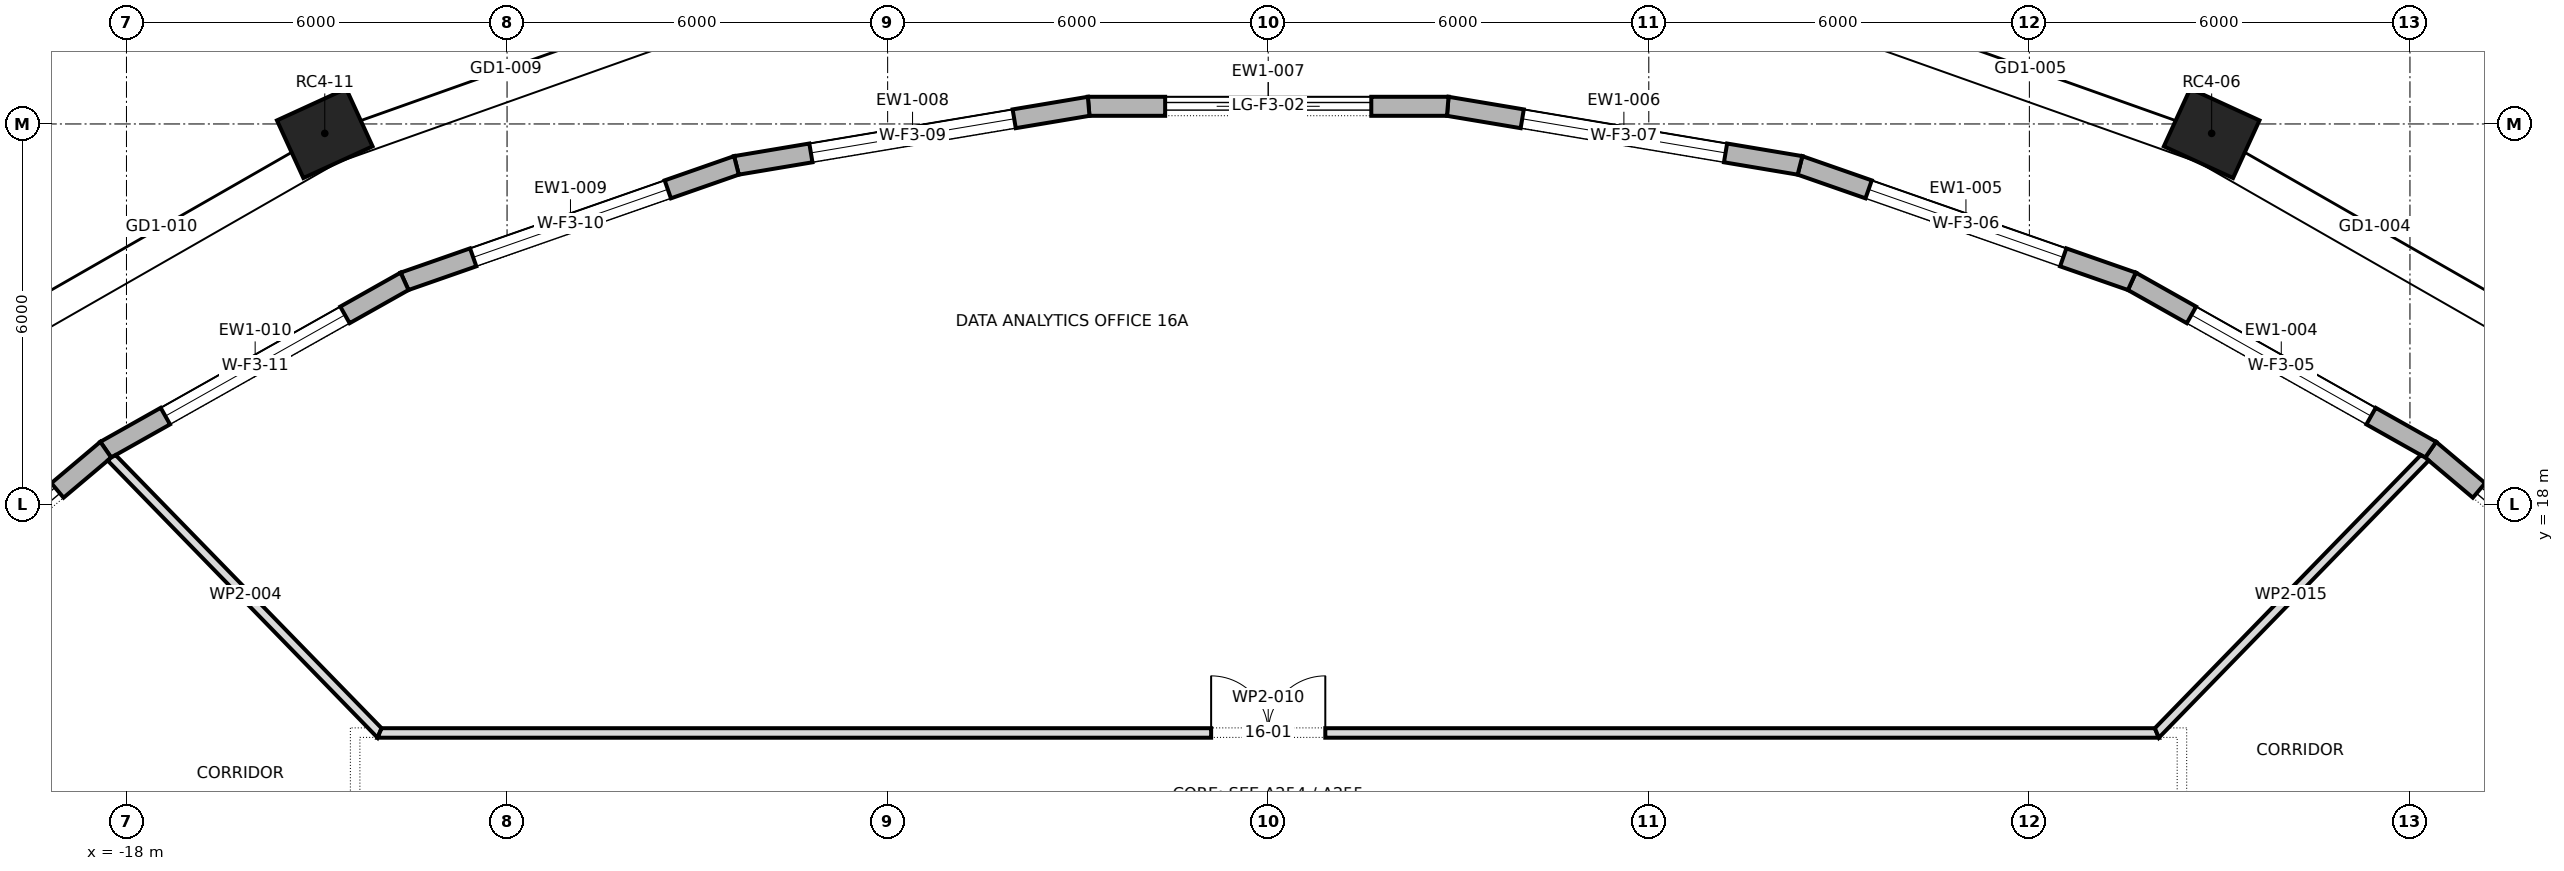
"""IFC4 building model, lengths in metres.
Left out: names, types, materials, properties, quantities, classifications, styles, units other than length and angle.
Written with IfcOpenShell. Run it as: python <this file> out.ifc"""

import sys

from ifc_helpers import new_model, si_unit, direction, frame, frame_2d, origin, origin_2d, place, context, subcontext, project, spatial, polyline, rectangle, outline, extrude, element, fill, save


model = new_model("IFC4")
c1 = context("Model", 3, precision=1e-05, world=origin(), true_north=direction((0.0, 1.0)))
c2 = subcontext(c1, "Body", "Model", "MODEL_VIEW")
j1 = project(units=[si_unit("LENGTHUNIT", "METRE"), si_unit("PLANEANGLEUNIT", "RADIAN")], contexts=[c1])
p1 = place(None, origin())
s1 = spatial("IfcSite", under=j1, at=p1, CompositionType="ELEMENT")
p2 = place(p1, origin())
s2 = spatial("IfcBuilding", under=s1, at=p2, CompositionType="ELEMENT")
p3 = place(p2, frame((0.0, 0.0, 226.9)))
s3 = spatial("IfcBuildingStorey", under=s2, at=p3, CompositionType="ELEMENT", Elevation=226.9)
for number, where, z_axis, x_axis in (
    (1, (14.874, 23.852, 0.0), (0.0, 0.0, 1.0), (-0.909, 0.417, 0.0)),
    (2, (-14.874, 23.852, 0.0), (0.0, 0.0, 1.0), (-0.909, -0.417, 0.0)),
):
    element("IfcColumn", number, at=place(p3, frame(where, z_axis=z_axis, x_axis=x_axis)), inside=s3, PredefinedType="COLUMN", context=c2, shape_type="SweptSolid", body=[
        extrude(rectangle(XDim=1.2, YDim=1.0, at=origin_2d()), origin(), (0.0, 0.0, 1.0), 4.0),
    ])
p4 = place(p3, frame((22.334, 15.486, 0.0), z_axis=(0.0, 0.0, 1.0), x_axis=(-0.764475071601, 0.644653290459, 0.0)))
e3 = element("IfcWall", 3, at=p4, inside=s3, PredefinedType="STANDARD", context=c2, shape_type="SweptSolid", body=[
    extrude(outline(polyline([(-0.015, -0.15), (5.257, -0.15), (5.229, 0.15), (0.015, 0.15), (-0.015, -0.15)])), origin(), (0.0, 0.0, 1.0), 3.7),
])
p5 = place(p4, frame((0.996, 0.0, 0.0)))
e4 = element("IfcOpeningElement", 4, at=p5, cuts=e3, PredefinedType="OPENING", context=c2, shape_type="SweptSolid", body=[
    extrude(rectangle(XDim=3.25, YDim=3.25, at=frame_2d((1.625, 1.625))), frame((0.0, 0.162, 0.0), z_axis=(0.0, -1.0, 0.0), x_axis=(1.0, 0.0, 0.0)), (0.0, 0.0, 1.0), 0.324),
])
p6 = place(p3, frame((18.326, 18.865, 0.0), z_axis=(0.0, 0.0, 1.0), x_axis=(-0.871225596594, 0.490882837181, 0.0)))
e5 = element("IfcWall", 5, at=p6, inside=s3, PredefinedType="STANDARD", context=c2, shape_type="SweptSolid", body=[
    extrude(outline(polyline([(-0.014, -0.15), (5.42, -0.15), (5.393, 0.15), (0.014, 0.15), (-0.014, -0.15)])), origin(), (0.0, 0.0, 1.0), 3.7),
])
p7 = place(p6, frame((1.078, 0.0, 0.6)))
e6 = element("IfcOpeningElement", 6, at=p7, cuts=e5, PredefinedType="OPENING", context=c2, shape_type="SweptSolid", body=[
    extrude(rectangle(XDim=3.25, YDim=2.65, at=frame_2d((1.625, 1.325))), frame((0.0, 0.162, 0.0), z_axis=(0.0, -1.0, 0.0), x_axis=(1.0, 0.0, 0.0)), (0.0, 0.0, 1.0), 0.324),
])
p8 = place(p3, frame((13.616, 21.52, 0.0), z_axis=(0.0, 0.0, 1.0), x_axis=(-0.944075859918, 0.329728328659, 0.0)))
e7 = element("IfcWall", 7, at=p8, inside=s3, PredefinedType="STANDARD", context=c2, shape_type="SweptSolid", body=[
    extrude(outline(polyline([(-0.013, -0.15), (5.555, -0.15), (5.53, 0.15), (0.013, 0.15), (-0.013, -0.15)])), origin(), (0.0, 0.0, 1.0), 3.7),
])
p9 = place(p8, frame((1.146, 0.0, 0.6)))
e8 = element("IfcOpeningElement", 8, at=p9, cuts=e7, PredefinedType="OPENING", context=c2, shape_type="SweptSolid", body=[
    extrude(rectangle(XDim=3.25, YDim=2.65, at=frame_2d((1.625, 1.325))), frame((0.0, 0.162, 0.0), z_axis=(0.0, -1.0, 0.0), x_axis=(1.0, 0.0, 0.0)), (0.0, 0.0, 1.0), 0.324),
])
p10 = place(p3, frame((8.384, 23.347, 0.0), z_axis=(0.0, 0.0, 1.0), x_axis=(-0.986223472554, 0.165418445715, 0.0)))
e9 = element("IfcWall", 9, at=p10, inside=s3, PredefinedType="STANDARD", context=c2, shape_type="SweptSolid", body=[
    extrude(outline(polyline([(-0.013, -0.15), (5.643, -0.15), (5.618, 0.15), (0.013, 0.15), (-0.013, -0.15)])), origin(), (0.0, 0.0, 1.0), 3.7),
])
p11 = place(p10, frame((1.19, 0.0, 0.6)))
e10 = element("IfcOpeningElement", 10, at=p11, cuts=e9, PredefinedType="OPENING", context=c2, shape_type="SweptSolid", body=[
    extrude(rectangle(XDim=3.25, YDim=2.65, at=frame_2d((1.625, 1.325))), frame((0.0, 0.162, 0.0), z_axis=(0.0, -1.0, 0.0), x_axis=(1.0, 0.0, 0.0)), (0.0, 0.0, 1.0), 0.324),
])
p12 = place(p3, frame((2.831, 24.278, 0.0), z_axis=(0.0, 0.0, 1.0), x_axis=(-1.0, 0.0, 0.0)))
e11 = element("IfcWall", 11, at=p12, inside=s3, PredefinedType="STANDARD", context=c2, shape_type="SweptSolid", body=[
    extrude(outline(polyline([(-0.012, -0.15), (5.674, -0.15), (5.649, 0.15), (0.012, 0.15), (-0.012, -0.15)])), origin(), (0.0, 0.0, 1.0), 3.7),
])
p13 = place(p12, frame((1.206, 0.0, 0.0)))
e12 = element("IfcOpeningElement", 12, at=p13, cuts=e11, PredefinedType="OPENING", context=c2, shape_type="SweptSolid", body=[
    extrude(rectangle(XDim=3.25, YDim=3.25, at=frame_2d((1.625, 1.625))), frame((0.0, 0.162, 0.0), z_axis=(0.0, -1.0, 0.0), x_axis=(1.0, 0.0, 0.0)), (0.0, 0.0, 1.0), 0.324),
])
p14 = place(p3, frame((-2.831, 24.278, 0.0), z_axis=(0.0, 0.0, 1.0), x_axis=(-0.986223472554, -0.165418445715, 0.0)))
e13 = element("IfcWall", 13, at=p14, inside=s3, PredefinedType="STANDARD", context=c2, shape_type="SweptSolid", body=[
    extrude(outline(polyline([(-0.012, -0.15), (5.643, -0.15), (5.618, 0.15), (0.012, 0.15), (-0.012, -0.15)])), origin(), (0.0, 0.0, 1.0), 3.7),
])
p15 = place(p14, frame((1.19, 0.0, 0.6)))
e14 = element("IfcOpeningElement", 14, at=p15, cuts=e13, PredefinedType="OPENING", context=c2, shape_type="SweptSolid", body=[
    extrude(rectangle(XDim=3.25, YDim=2.65, at=frame_2d((1.625, 1.325))), frame((0.0, 0.162, 0.0), z_axis=(0.0, -1.0, 0.0), x_axis=(1.0, 0.0, 0.0)), (0.0, 0.0, 1.0), 0.324),
])
p16 = place(p3, frame((-8.384, 23.347, 0.0), z_axis=(0.0, 0.0, 1.0), x_axis=(-0.944075859918, -0.329728328659, 0.0)))
e15 = element("IfcWall", 15, at=p16, inside=s3, PredefinedType="STANDARD", context=c2, shape_type="SweptSolid", body=[
    extrude(outline(polyline([(-0.013, -0.15), (5.556, -0.15), (5.529, 0.15), (0.013, 0.15), (-0.013, -0.15)])), origin(), (0.0, 0.0, 1.0), 3.7),
])
p17 = place(p16, frame((1.146, 0.0, 0.6)))
e16 = element("IfcOpeningElement", 16, at=p17, cuts=e15, PredefinedType="OPENING", context=c2, shape_type="SweptSolid", body=[
    extrude(rectangle(XDim=3.25, YDim=2.65, at=frame_2d((1.625, 1.325))), frame((0.0, 0.162, 0.0), z_axis=(0.0, -1.0, 0.0), x_axis=(1.0, 0.0, 0.0)), (0.0, 0.0, 1.0), 0.324),
])
p18 = place(p3, frame((-13.616, 21.52, 0.0), z_axis=(0.0, 0.0, 1.0), x_axis=(-0.871225596594, -0.490882837181, 0.0)))
e17 = element("IfcWall", 17, at=p18, inside=s3, PredefinedType="STANDARD", context=c2, shape_type="SweptSolid", body=[
    extrude(outline(polyline([(-0.013, -0.15), (5.421, -0.15), (5.393, 0.15), (0.013, 0.15), (-0.013, -0.15)])), origin(), (0.0, 0.0, 1.0), 3.7),
])
p19 = place(p18, frame((1.078, 0.0, 0.6)))
e18 = element("IfcOpeningElement", 18, at=p19, cuts=e17, PredefinedType="OPENING", context=c2, shape_type="SweptSolid", body=[
    extrude(rectangle(XDim=3.25, YDim=2.65, at=frame_2d((1.625, 1.325))), frame((0.0, 0.162, 0.0), z_axis=(0.0, -1.0, 0.0), x_axis=(1.0, 0.0, 0.0)), (0.0, 0.0, 1.0), 0.324),
])
p20 = place(p3, frame((-18.326, 18.865, 0.0), z_axis=(0.0, 0.0, 1.0), x_axis=(-0.764475071601, -0.644653290459, 0.0)))
e19 = element("IfcWall", 19, at=p20, inside=s3, PredefinedType="STANDARD", context=c2, shape_type="SweptSolid", body=[
    extrude(outline(polyline([(-0.014, -0.15), (5.258, -0.15), (5.228, 0.15), (0.014, 0.15), (-0.014, -0.15)])), origin(), (0.0, 0.0, 1.0), 3.7),
])
p21 = place(p20, frame((0.996, 0.0, 0.0)))
e20 = element("IfcOpeningElement", 20, at=p21, cuts=e19, PredefinedType="OPENING", context=c2, shape_type="SweptSolid", body=[
    extrude(rectangle(XDim=3.25, YDim=3.25, at=frame_2d((1.625, 1.625))), frame((0.0, 0.162, 0.0), z_axis=(0.0, -1.0, 0.0), x_axis=(1.0, 0.0, 0.0)), (0.0, 0.0, 1.0), 0.324),
])
p22 = place(p3, frame((-18.242, 18.747, 0.0), z_axis=(0.0, 0.0, 1.0), x_axis=(0.697616683155, -0.716471188105, 0.0)))
e21 = element("IfcWall", 21, at=p22, inside=s3, PredefinedType="PARTITIONING", context=c2, shape_type="SweptSolid", body=[
    extrude(outline(polyline([(0.0, -0.075), (1.525, -0.075), (3.049, -0.075), (4.574, -0.075), (6.099, -0.075), (6.067, 0.0), (6.035, 0.075), (4.533, 0.075), (3.031, 0.075), (1.528, 0.075), (0.025, 0.075), (0.005, -0.002), (0.0, -0.072), (0.0, -0.075)])), origin(), (0.0, 0.0, 1.0), 3.7),
])
p23 = place(p3, frame((-14.368, 9.948, 0.0), z_axis=(0.0, 0.0, 1.0), x_axis=(-0.822511136101, 0.568749005265, 0.0)))
e22 = element("IfcWall", 22, at=p23, inside=s3, PredefinedType="PARTITIONING", context=c2, shape_type="SweptSolid", body=[
    extrude(outline(polyline([(0.0, -0.075), (1.907, -0.075), (3.813, -0.075), (5.72, -0.075), (7.627, -0.075), (9.533, -0.075), (9.554, 0.0), (9.558, 0.069), (9.558, 0.075), (7.662, 0.075), (5.767, 0.075), (3.871, 0.075), (1.975, 0.075), (0.079, 0.075), (0.079, 0.075), (0.079, 0.075), (0.039, 0.0), (0.0, -0.075)])), origin(), (0.0, 0.0, 1.0), 2.947),
])
p24 = place(p3, frame((-14.042, 14.4, 0.0), z_axis=(0.0, 0.0, 1.0), x_axis=(1.0, 0.0, 0.0)))
e23 = element("IfcWall", 23, at=p24, inside=s3, PredefinedType="PARTITIONING", context=c2, shape_type="SweptSolid", body=[
    extrude(outline(polyline([(0.0, -0.075), (1.872, -0.075), (3.745, -0.075), (5.617, -0.075), (7.489, -0.075), (9.361, -0.075), (11.233, -0.075), (13.106, -0.075), (14.978, -0.075), (16.85, -0.075), (18.722, -0.075), (20.594, -0.075), (22.467, -0.075), (24.339, -0.075), (26.211, -0.075), (28.083, -0.075), (28.02, 0.075), (26.023, 0.075), (24.026, 0.075), (22.029, 0.075), (20.032, 0.075), (18.036, 0.075), (16.039, 0.075), (14.042, 0.075), (12.045, 0.075), (10.048, 0.075), (8.051, 0.075), (6.054, 0.075), (4.057, 0.075), (2.06, 0.075), (0.063, 0.075), (0.0, -0.075)])), origin(), (0.0, 0.0, 1.0), 3.7),
])
p25 = place(p24, frame((13.142, 0.0, 0.0)))
e24 = element("IfcOpeningElement", 24, at=p25, cuts=e23, PredefinedType="OPENING", context=c2, shape_type="SweptSolid", body=[
    extrude(rectangle(XDim=1.8, YDim=2.1, at=frame_2d((0.9, 1.05))), frame((0.0, 0.087, 0.0), z_axis=(0.0, -1.0, 0.0), x_axis=(1.0, 0.0, 0.0)), (0.0, 0.0, 1.0), 0.174),
])
p26 = place(p3, frame((13.988, 14.377, 0.0), z_axis=(0.0, 0.0, 1.0), x_axis=(0.697616683155, 0.716471188105, 0.0)))
e25 = element("IfcWall", 25, at=p26, inside=s3, PredefinedType="PARTITIONING", context=c2, shape_type="SweptSolid", body=[
    extrude(outline(polyline([(6.099, -0.075), (6.099, -0.073), (6.094, -0.002), (6.073, 0.075), (4.571, 0.075), (3.068, 0.075), (1.566, 0.075), (0.063, 0.075), (0.032, 0.0), (0.0, -0.075), (1.525, -0.075), (3.05, -0.075), (4.574, -0.075), (6.099, -0.075)])), origin(), (0.0, 0.0, 1.0), 3.7),
])
p27 = place(p3, frame((18.405, 12.733, 0.0), z_axis=(0.0, 0.0, 1.0), x_axis=(0.821978662859, 0.569518285751, 0.0)))
e26 = element("IfcWall", 26, at=p27, inside=s3, PredefinedType="PARTITIONING", context=c2, shape_type="SweptSolid", body=[
    extrude(outline(polyline([(4.652, -0.06), (4.652, -0.055), (4.649, 0.0), (4.633, 0.06), (3.088, 0.06), (1.544, 0.06), (0.0, 0.06), (0.0, -0.051), (0.013, -0.06), (1.56, -0.06), (3.106, -0.06), (4.652, -0.06)])), origin(), (0.0, 0.0, 1.0), 3.7),
])
p28 = place(p5, origin())
e27 = element("IfcDoor", 27, at=p28, inside=s3, OperationType="DOUBLE_DOOR_SLIDING", PredefinedType="DOOR", context=c2, shape_type="SweptSolid", body=[
    extrude(rectangle(XDim=3.25, YDim=3.25, at=frame_2d((1.625, 1.625))), frame((0.0, 0.025, 0.0), z_axis=(0.0, -1.0, 0.0), x_axis=(1.0, 0.0, 0.0)), (0.0, 0.0, 1.0), 0.05),
])
fill(e4, e27)
p29 = place(p7, origin())
e28 = element("IfcWindow", 28, at=p29, inside=s3, PartitioningType="TRIPLE_PANEL_VERTICAL", PredefinedType="WINDOW", context=c2, shape_type="SweptSolid", body=[
    extrude(rectangle(XDim=3.25, YDim=2.65, at=frame_2d((1.625, 1.325))), frame((0.0, 0.03, 0.0), z_axis=(0.0, -1.0, 0.0), x_axis=(1.0, 0.0, 0.0)), (0.0, 0.0, 1.0), 0.06),
])
fill(e6, e28)
p30 = place(p9, origin())
e29 = element("IfcWindow", 29, at=p30, inside=s3, PartitioningType="TRIPLE_PANEL_VERTICAL", PredefinedType="WINDOW", context=c2, shape_type="SweptSolid", body=[
    extrude(rectangle(XDim=3.25, YDim=2.65, at=frame_2d((1.625, 1.325))), frame((0.0, 0.03, 0.0), z_axis=(0.0, -1.0, 0.0), x_axis=(1.0, 0.0, 0.0)), (0.0, 0.0, 1.0), 0.06),
])
fill(e8, e29)
p31 = place(p11, origin())
e30 = element("IfcWindow", 30, at=p31, inside=s3, PartitioningType="TRIPLE_PANEL_VERTICAL", PredefinedType="WINDOW", context=c2, shape_type="SweptSolid", body=[
    extrude(rectangle(XDim=3.25, YDim=2.65, at=frame_2d((1.625, 1.325))), frame((0.0, 0.03, 0.0), z_axis=(0.0, -1.0, 0.0), x_axis=(1.0, 0.0, 0.0)), (0.0, 0.0, 1.0), 0.06),
])
fill(e10, e30)
p32 = place(p13, origin())
e31 = element("IfcDoor", 31, at=p32, inside=s3, OperationType="DOUBLE_DOOR_SLIDING", PredefinedType="DOOR", context=c2, shape_type="SweptSolid", body=[
    extrude(rectangle(XDim=3.25, YDim=3.25, at=frame_2d((1.625, 1.625))), frame((0.0, 0.025, 0.0), z_axis=(0.0, -1.0, 0.0), x_axis=(1.0, 0.0, 0.0)), (0.0, 0.0, 1.0), 0.05),
])
fill(e12, e31)
p33 = place(p15, origin())
e32 = element("IfcWindow", 32, at=p33, inside=s3, PartitioningType="TRIPLE_PANEL_VERTICAL", PredefinedType="WINDOW", context=c2, shape_type="SweptSolid", body=[
    extrude(rectangle(XDim=3.25, YDim=2.65, at=frame_2d((1.625, 1.325))), frame((0.0, 0.03, 0.0), z_axis=(0.0, -1.0, 0.0), x_axis=(1.0, 0.0, 0.0)), (0.0, 0.0, 1.0), 0.06),
])
fill(e14, e32)
p34 = place(p17, origin())
e33 = element("IfcWindow", 33, at=p34, inside=s3, PartitioningType="TRIPLE_PANEL_VERTICAL", PredefinedType="WINDOW", context=c2, shape_type="SweptSolid", body=[
    extrude(rectangle(XDim=3.25, YDim=2.65, at=frame_2d((1.625, 1.325))), frame((0.0, 0.03, 0.0), z_axis=(0.0, -1.0, 0.0), x_axis=(1.0, 0.0, 0.0)), (0.0, 0.0, 1.0), 0.06),
])
fill(e16, e33)
p35 = place(p19, origin())
e34 = element("IfcWindow", 34, at=p35, inside=s3, PartitioningType="TRIPLE_PANEL_VERTICAL", PredefinedType="WINDOW", context=c2, shape_type="SweptSolid", body=[
    extrude(rectangle(XDim=3.25, YDim=2.65, at=frame_2d((1.625, 1.325))), frame((0.0, 0.03, 0.0), z_axis=(0.0, -1.0, 0.0), x_axis=(1.0, 0.0, 0.0)), (0.0, 0.0, 1.0), 0.06),
])
fill(e18, e34)
p36 = place(p21, origin())
e35 = element("IfcDoor", 35, at=p36, inside=s3, OperationType="DOUBLE_DOOR_SLIDING", PredefinedType="DOOR", context=c2, shape_type="SweptSolid", body=[
    extrude(rectangle(XDim=3.25, YDim=3.25, at=frame_2d((1.625, 1.625))), frame((0.0, 0.025, 0.0), z_axis=(0.0, -1.0, 0.0), x_axis=(1.0, 0.0, 0.0)), (0.0, 0.0, 1.0), 0.05),
])
fill(e20, e35)
p37 = place(p25, origin())
e36 = element("IfcDoor", 36, at=p37, inside=s3, OperationType="DOUBLE_DOOR_SINGLE_SWING", PredefinedType="DOOR", context=c2, shape_type="SweptSolid", body=[
    extrude(rectangle(XDim=1.8, YDim=2.1, at=frame_2d((0.9, 1.05))), frame((0.0, 0.025, 0.0), z_axis=(0.0, -1.0, 0.0), x_axis=(1.0, 0.0, 0.0)), (0.0, 0.0, 1.0), 0.05),
])
fill(e24, e36)
save(model, sys.argv[1])
